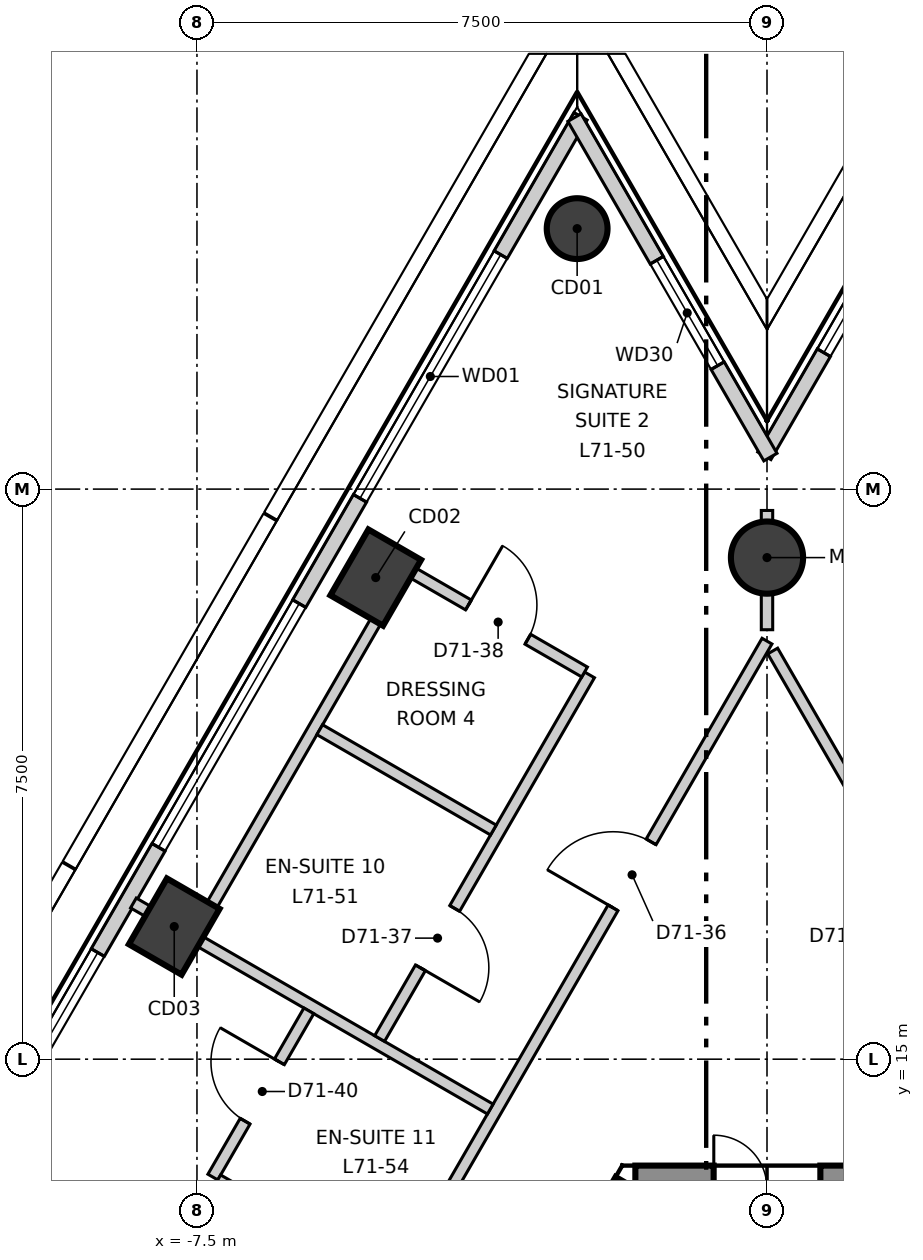
"""IFC4 building model, lengths in metres.
Left out: names, types, materials, properties, quantities, classifications, styles, units other than length and angle.
Written with IfcOpenShell. Run it as: python <this file> out.ifc"""

import sys

from ifc_helpers import new_model, si_unit, direction, frame, frame_2d, origin, origin_2d, place, context, subcontext, project, spatial, polyline, rectangle, circle, outline, extrude, element, fill, save


model = new_model("IFC4")
c1 = context("Model", 3, precision=1e-05, world=origin(), true_north=direction((0.0, 1.0)))
c2 = subcontext(c1, "Body", "Model", "MODEL_VIEW")
j1 = project(units=[si_unit("LENGTHUNIT", "METRE"), si_unit("PLANEANGLEUNIT", "RADIAN")], contexts=[c1])
p1 = place(None, origin())
s1 = spatial("IfcSite", under=j1, at=p1, CompositionType="ELEMENT")
p2 = place(p1, origin())
s2 = spatial("IfcBuilding", under=s1, at=p2, CompositionType="ELEMENT")
p3 = place(p2, frame((0.0, 0.0, 300.7)))
s3 = spatial("IfcBuildingStorey", under=s2, at=p3, CompositionType="ELEMENT", Elevation=300.7)
p4 = place(p3, frame((1.732, 13.3, -0.3), z_axis=(0.0, 0.0, 1.0), x_axis=(-1.0, 0.0, 0.0)))
e1 = element("IfcWall", 1, at=p4, inside=s3, PredefinedType="SHEAR", context=c2, shape_type="SweptSolid", body=[
    extrude(outline(polyline([(-0.173, -0.3), (1.732, -0.3), (3.637, -0.3), (3.291, 0.3), (1.732, 0.3), (0.173, 0.3), (-0.173, -0.3)])), origin(), (0.0, 0.0, 1.0), 3.6),
])
p5 = place(p4, frame((1.032, 0.0, 0.3)))
e2 = element("IfcOpeningElement", 2, at=p5, cuts=e1, PredefinedType="OPENING", context=c2, shape_type="SweptSolid", body=[
    extrude(rectangle(XDim=1.4, YDim=2.1, at=frame_2d((0.7, 1.05))), frame((0.0, 0.31, 0.0), z_axis=(0.0, -1.0, 0.0), x_axis=(1.0, 0.0, 0.0)), (0.0, 0.0, 1.0), 0.62),
])
p6 = place(p3, frame((-1.732, 13.3, -0.3), z_axis=(0.0, 0.0, 1.0), x_axis=(-0.500000539815, -0.866025092122, 0.0)))
e3 = element("IfcWall", 3, at=p6, inside=s3, PredefinedType="SHEAR", context=c2, shape_type="SweptSolid", body=[
    extrude(outline(polyline([(-0.173, -0.3), (1.795, -0.3), (3.763, -0.3), (5.732, -0.3), (7.7, -0.3), (9.668, -0.301), (11.637, -0.301), (13.605, -0.301), (15.573, -0.301), (17.542, -0.301), (19.51, -0.301), (21.478, -0.301), (21.131, 0.3), (19.226, 0.3), (17.321, 0.3), (15.415, 0.3), (13.51, 0.3), (11.605, 0.3), (9.699, 0.3), (7.794, 0.3), (5.889, 0.3), (3.984, 0.3), (2.078, 0.3), (0.173, 0.3), (-0.173, -0.3)])), origin(), (0.0, 0.0, 1.0), 3.6),
])
p7 = place(p6, frame((10.102, 0.0, 0.3)))
e4 = element("IfcOpeningElement", 4, at=p7, cuts=e3, PredefinedType="OPENING", context=c2, shape_type="SweptSolid", body=[
    extrude(rectangle(XDim=1.1, YDim=2.1, at=frame_2d((0.55, 1.05))), frame((0.0, 0.31, 0.0), z_axis=(0.0, -1.0, 0.0), x_axis=(1.0, 0.0, 0.0)), (0.0, 0.0, 1.0), 0.621),
])
p8 = place(p6, frame((16.378, 0.0, 0.3)))
e5 = element("IfcOpeningElement", 5, at=p8, cuts=e3, PredefinedType="OPENING", context=c2, shape_type="SweptSolid", body=[
    extrude(rectangle(XDim=0.9, YDim=2.1, at=frame_2d((0.45, 1.05))), frame((0.0, 0.31, 0.0), z_axis=(0.0, -1.0, 0.0), x_axis=(1.0, 0.0, 0.0)), (0.0, 0.0, 1.0), 0.621),
])
p9 = place(p6, frame((4.026, 0.0, 0.3)))
e6 = element("IfcOpeningElement", 6, at=p9, cuts=e3, PredefinedType="OPENING", context=c2, shape_type="SweptSolid", body=[
    extrude(rectangle(XDim=0.9, YDim=2.1, at=frame_2d((0.45, 1.05))), frame((0.0, 0.31, 0.0), z_axis=(0.0, -1.0, 0.0), x_axis=(1.0, 0.0, 0.0)), (0.0, 0.0, 1.0), 0.621),
])
p10 = place(p3, frame((-2.498, 25.927, -0.3), z_axis=(0.0, 0.0, 1.0), x_axis=(0.5, 0.866025403784, 0.0)))
e7 = element("IfcColumn", 7, at=p10, inside=s3, PredefinedType="COLUMN", context=c2, shape_type="SweptSolid", body=[
    extrude(circle(Radius=0.4, at=origin_2d()), origin(), (0.0, 0.0, 1.0), 3.6),
])
for number, where, z_axis, x_axis in (
    (8, (-5.148, 21.336, -0.3), (0.0, 0.0, 1.0), (0.5, 0.866, 0.0)),
    (9, (-7.799, 16.745, -0.3), (0.0, 0.0, 1.0), (0.5, 0.866, 0.0)),
):
    element("IfcColumn", number, at=place(p3, frame(where, z_axis=z_axis, x_axis=x_axis)), inside=s3, PredefinedType="COLUMN", context=c2, shape_type="SweptSolid", body=[
        extrude(rectangle(XDim=1.0, YDim=0.8, at=origin_2d()), origin(), (0.0, 0.0, 1.0), 3.6),
    ])
p11 = place(p3, frame((0.0, 21.599, -0.3), z_axis=(0.0, 0.0, 1.0), x_axis=(1.0, 0.0, 0.0)))
e10 = element("IfcColumn", 10, at=p11, inside=s3, PredefinedType="COLUMN", context=c2, shape_type="SweptSolid", body=[
    extrude(circle(Radius=0.475, at=origin_2d()), origin(), (0.0, 0.0, 1.0), 3.6),
])
p12 = place(p3, frame((-2.453, 27.405, 0.0), z_axis=(0.0, 0.0, 1.0), x_axis=(-0.500000041859, -0.866025379617, 0.0)))
e11 = element("IfcWall", 11, at=p12, inside=s3, PredefinedType="ELEMENTEDWALL", context=c2, shape_type="SweptSolid", body=[
    extrude(rectangle(XDim=44.994, YDim=0.2, at=frame_2d((22.497, 0.0))), origin(), (0.0, 0.0, 1.0), 3.3),
])
p13 = place(p12, frame((2.103, 0.0, 0.9)))
e12 = element("IfcOpeningElement", 12, at=p13, cuts=e11, PredefinedType="OPENING", context=c2, shape_type="SweptSolid", body=[
    extrude(rectangle(XDim=3.7, YDim=2.2, at=frame_2d((1.85, 1.1))), frame((0.0, 0.11, 0.0), z_axis=(0.0, -1.0, 0.0), x_axis=(1.0, 0.0, 0.0)), (0.0, 0.0, 1.0), 0.22),
])
p14 = place(p12, frame((7.404, 0.0, 0.9)))
e13 = element("IfcOpeningElement", 13, at=p14, cuts=e11, PredefinedType="OPENING", context=c2, shape_type="SweptSolid", body=[
    extrude(rectangle(XDim=3.7, YDim=2.2, at=frame_2d((1.85, 1.1))), frame((0.0, 0.11, 0.0), z_axis=(0.0, -1.0, 0.0), x_axis=(1.0, 0.0, 0.0)), (0.0, 0.0, 1.0), 0.22),
])
p15 = place(p12, frame((12.705, 0.0, 0.9)))
e14 = element("IfcOpeningElement", 14, at=p15, cuts=e11, PredefinedType="OPENING", context=c2, shape_type="SweptSolid", body=[
    extrude(rectangle(XDim=3.7, YDim=2.2, at=frame_2d((1.85, 1.1))), frame((0.0, 0.11, 0.0), z_axis=(0.0, -1.0, 0.0), x_axis=(1.0, 0.0, 0.0)), (0.0, 0.0, 1.0), 0.22),
])
p16 = place(p12, frame((18.006, 0.0, 0.9)))
e15 = element("IfcOpeningElement", 15, at=p16, cuts=e11, PredefinedType="OPENING", context=c2, shape_type="SweptSolid", body=[
    extrude(rectangle(XDim=3.7, YDim=2.2, at=frame_2d((1.85, 1.1))), frame((0.0, 0.11, 0.0), z_axis=(0.0, -1.0, 0.0), x_axis=(1.0, 0.0, 0.0)), (0.0, 0.0, 1.0), 0.22),
])
p17 = place(p12, frame((23.307, 0.0, 0.9)))
e16 = element("IfcOpeningElement", 16, at=p17, cuts=e11, PredefinedType="OPENING", context=c2, shape_type="SweptSolid", body=[
    extrude(rectangle(XDim=3.7, YDim=2.2, at=frame_2d((1.85, 1.1))), frame((0.0, 0.11, 0.0), z_axis=(0.0, -1.0, 0.0), x_axis=(1.0, 0.0, 0.0)), (0.0, 0.0, 1.0), 0.22),
])
p18 = place(p12, frame((28.608, 0.0, 0.9)))
e17 = element("IfcOpeningElement", 17, at=p18, cuts=e11, PredefinedType="OPENING", context=c2, shape_type="SweptSolid", body=[
    extrude(rectangle(XDim=3.7, YDim=2.2, at=frame_2d((1.85, 1.1))), frame((0.0, 0.11, 0.0), z_axis=(0.0, -1.0, 0.0), x_axis=(1.0, 0.0, 0.0)), (0.0, 0.0, 1.0), 0.22),
])
p19 = place(p12, frame((33.909, 0.0, 0.9)))
e18 = element("IfcOpeningElement", 18, at=p19, cuts=e11, PredefinedType="OPENING", context=c2, shape_type="SweptSolid", body=[
    extrude(rectangle(XDim=3.7, YDim=2.2, at=frame_2d((1.85, 1.1))), frame((0.0, 0.11, 0.0), z_axis=(0.0, -1.0, 0.0), x_axis=(1.0, 0.0, 0.0)), (0.0, 0.0, 1.0), 0.22),
])
p20 = place(p12, frame((39.21, 0.0, 0.9)))
e19 = element("IfcOpeningElement", 19, at=p20, cuts=e11, PredefinedType="OPENING", context=c2, shape_type="SweptSolid", body=[
    extrude(rectangle(XDim=3.7, YDim=2.2, at=frame_2d((1.85, 1.1))), frame((0.0, 0.11, 0.0), z_axis=(0.0, -1.0, 0.0), x_axis=(1.0, 0.0, 0.0)), (0.0, 0.0, 1.0), 0.22),
])
p21 = place(p3, frame((2.543, 27.405, 0.0), z_axis=(0.0, 0.0, 1.0), x_axis=(-0.49983036304, -0.866123321579, 0.0)))
e20 = element("IfcWall", 20, at=p21, inside=s3, PredefinedType="ELEMENTEDWALL", context=c2, shape_type="SweptSolid", body=[
    extrude(rectangle(XDim=5.157, YDim=0.2, at=frame_2d((2.579, 0.0))), origin(), (0.0, 0.0, 1.0), 3.3),
])
p22 = place(p21, frame((1.99, 0.0, 0.9)))
e21 = element("IfcOpeningElement", 21, at=p22, cuts=e20, PredefinedType="OPENING", context=c2, shape_type="SweptSolid", body=[
    extrude(rectangle(XDim=1.6, YDim=2.2, at=frame_2d((0.8, 1.1))), frame((0.0, 0.11, 0.0), z_axis=(0.0, -1.0, 0.0), x_axis=(1.0, 0.0, 0.0)), (0.0, 0.0, 1.0), 0.22),
])
p23 = place(p3, frame((0.045, 22.921, 0.0), z_axis=(0.0, 0.0, 1.0), x_axis=(-0.49983036304, 0.866123321579, 0.0)))
e22 = element("IfcWall", 22, at=p23, inside=s3, PredefinedType="ELEMENTEDWALL", context=c2, shape_type="SweptSolid", body=[
    extrude(rectangle(XDim=5.157, YDim=0.2, at=frame_2d((2.579, 0.0))), origin(), (0.0, 0.0, 1.0), 3.3),
])
p24 = place(p23, frame((1.39, 0.0, 0.9)))
e23 = element("IfcOpeningElement", 23, at=p24, cuts=e22, PredefinedType="OPENING", context=c2, shape_type="SweptSolid", body=[
    extrude(rectangle(XDim=1.6, YDim=2.2, at=frame_2d((0.8, 1.1))), frame((0.0, 0.11, 0.0), z_axis=(0.0, -1.0, 0.0), x_axis=(1.0, 0.0, 0.0)), (0.0, 0.0, 1.0), 0.22),
])
p25 = place(p3, frame((-17.679, -10.12, 0.0), z_axis=(0.0, 0.0, 1.0), x_axis=(0.500008955215, 0.866020233427, 0.0)))
e24 = element("IfcWall", 24, at=p25, inside=s3, PredefinedType="PARTITIONING", context=c2, shape_type="SweptSolid", body=[
    extrude(rectangle(XDim=35.357, YDim=0.15, at=frame_2d((17.679, 0.0))), origin(), (0.0, 0.0, 1.0), 3.3),
])
p26 = place(p25, frame((31.307, 0.0, 0.0)))
e25 = element("IfcOpeningElement", 25, at=p26, cuts=e24, PredefinedType="OPENING", context=c2, shape_type="SweptSolid", body=[
    extrude(rectangle(XDim=1.0, YDim=2.1, at=frame_2d((0.5, 1.05))), frame((0.0, 0.085, 0.0), z_axis=(0.0, -1.0, 0.0), x_axis=(1.0, 0.0, 0.0)), (0.0, 0.0, 1.0), 0.17),
])
p27 = place(p25, frame((20.056, 0.0, 0.0)))
e26 = element("IfcOpeningElement", 26, at=p27, cuts=e24, PredefinedType="OPENING", context=c2, shape_type="SweptSolid", body=[
    extrude(rectangle(XDim=1.0, YDim=2.1, at=frame_2d((0.5, 1.05))), frame((0.0, 0.085, 0.0), z_axis=(0.0, -1.0, 0.0), x_axis=(1.0, 0.0, 0.0)), (0.0, 0.0, 1.0), 0.17),
])
p28 = place(p25, frame((13.253, 0.0, 0.0)))
e27 = element("IfcOpeningElement", 27, at=p28, cuts=e24, PredefinedType="OPENING", context=c2, shape_type="SweptSolid", body=[
    extrude(rectangle(XDim=1.0, YDim=2.1, at=frame_2d((0.5, 1.05))), frame((0.0, 0.085, 0.0), z_axis=(0.0, -1.0, 0.0), x_axis=(1.0, 0.0, 0.0)), (0.0, 0.0, 1.0), 0.17),
])
p29 = place(p25, frame((7.653, 0.0, 0.0)))
e28 = element("IfcOpeningElement", 28, at=p29, cuts=e24, PredefinedType="OPENING", context=c2, shape_type="SweptSolid", body=[
    extrude(rectangle(XDim=1.0, YDim=2.1, at=frame_2d((0.5, 1.05))), frame((0.0, 0.085, 0.0), z_axis=(0.0, -1.0, 0.0), x_axis=(1.0, 0.0, 0.0)), (0.0, 0.0, 1.0), 0.17),
])
p30 = place(p25, frame((2.952, 0.0, 0.0)))
e29 = element("IfcOpeningElement", 29, at=p30, cuts=e24, PredefinedType="OPENING", context=c2, shape_type="SweptSolid", body=[
    extrude(rectangle(XDim=1.0, YDim=2.1, at=frame_2d((0.5, 1.05))), frame((0.0, 0.085, 0.0), z_axis=(0.0, -1.0, 0.0), x_axis=(1.0, 0.0, 0.0)), (0.0, 0.0, 1.0), 0.17),
])
p31 = place(p3, frame((-8.336, 17.055, 0.0), z_axis=(0.0, 0.0, 1.0), x_axis=(0.865995092734, -0.500052496605, 0.0)))
e30 = element("IfcWall", 30, at=p31, inside=s3, PredefinedType="PARTITIONING", context=c2, shape_type="SweptSolid", body=[
    extrude(rectangle(XDim=5.421, YDim=0.15, at=frame_2d((2.711, 0.0))), origin(), (0.0, 0.0, 1.0), 3.3),
])
p32 = place(p3, frame((0.0, 20.65, 0.0), z_axis=(0.0, 0.0, 1.0), x_axis=(0.0, 1.0, 0.0)))
e31 = element("IfcWall", 31, at=p32, inside=s3, PredefinedType="PARTITIONING", context=c2, shape_type="SweptSolid", body=[
    extrude(rectangle(XDim=1.569, YDim=0.15, at=frame_2d((0.785, 0.0))), origin(), (0.0, 0.0, 1.0), 2.8),
])
p33 = place(p3, frame((0.075, 20.37, 0.0), z_axis=(0.0, 0.0, 1.0), x_axis=(0.500009775255, -0.866019759965, 0.0)))
e32 = element("IfcWall", 32, at=p33, inside=s3, PredefinedType="PARTITIONING", context=c2, shape_type="SweptSolid", body=[
    extrude(rectangle(XDim=35.207, YDim=0.15, at=frame_2d((17.604, 0.0))), origin(), (0.0, 0.0, 1.0), 3.3),
])
p34 = place(p33, frame((31.307, 0.0, 0.0)))
e33 = element("IfcOpeningElement", 33, at=p34, cuts=e32, PredefinedType="OPENING", context=c2, shape_type="SweptSolid", body=[
    extrude(rectangle(XDim=1.0, YDim=2.1, at=frame_2d((0.5, 1.05))), frame((0.0, 0.085, 0.0), z_axis=(0.0, -1.0, 0.0), x_axis=(1.0, 0.0, 0.0)), (0.0, 0.0, 1.0), 0.17),
])
p35 = place(p33, frame((20.355, 0.0, 0.0)))
e34 = element("IfcOpeningElement", 34, at=p35, cuts=e32, PredefinedType="OPENING", context=c2, shape_type="SweptSolid", body=[
    extrude(rectangle(XDim=1.0, YDim=2.1, at=frame_2d((0.5, 1.05))), frame((0.0, 0.085, 0.0), z_axis=(0.0, -1.0, 0.0), x_axis=(1.0, 0.0, 0.0)), (0.0, 0.0, 1.0), 0.17),
])
p36 = place(p33, frame((24.355, 0.0, 0.0)))
e35 = element("IfcOpeningElement", 35, at=p36, cuts=e32, PredefinedType="OPENING", context=c2, shape_type="SweptSolid", body=[
    extrude(rectangle(XDim=0.9, YDim=2.1, at=frame_2d((0.45, 1.05))), frame((0.0, 0.085, 0.0), z_axis=(0.0, -1.0, 0.0), x_axis=(1.0, 0.0, 0.0)), (0.0, 0.0, 1.0), 0.17),
])
p37 = place(p33, frame((22.255, 0.0, 0.0)))
e36 = element("IfcOpeningElement", 36, at=p37, cuts=e32, PredefinedType="OPENING", context=c2, shape_type="SweptSolid", body=[
    extrude(rectangle(XDim=0.9, YDim=2.1, at=frame_2d((0.45, 1.05))), frame((0.0, 0.085, 0.0), z_axis=(0.0, -1.0, 0.0), x_axis=(1.0, 0.0, 0.0)), (0.0, 0.0, 1.0), 0.17),
])
p38 = place(p33, frame((8.453, 0.0, 0.0)))
e37 = element("IfcOpeningElement", 37, at=p38, cuts=e32, PredefinedType="OPENING", context=c2, shape_type="SweptSolid", body=[
    extrude(rectangle(XDim=1.0, YDim=2.1, at=frame_2d((0.5, 1.05))), frame((0.0, 0.085, 0.0), z_axis=(0.0, -1.0, 0.0), x_axis=(1.0, 0.0, 0.0)), (0.0, 0.0, 1.0), 0.17),
])
p39 = place(p33, frame((13.753, 0.0, 0.0)))
e38 = element("IfcOpeningElement", 38, at=p39, cuts=e32, PredefinedType="OPENING", context=c2, shape_type="SweptSolid", body=[
    extrude(rectangle(XDim=0.9, YDim=2.1, at=frame_2d((0.45, 1.05))), frame((0.0, 0.085, 0.0), z_axis=(0.0, -1.0, 0.0), x_axis=(1.0, 0.0, 0.0)), (0.0, 0.0, 1.0), 0.17),
])
p40 = place(p33, frame((11.553, 0.0, 0.0)))
e39 = element("IfcOpeningElement", 39, at=p40, cuts=e32, PredefinedType="OPENING", context=c2, shape_type="SweptSolid", body=[
    extrude(rectangle(XDim=0.9, YDim=2.1, at=frame_2d((0.45, 1.05))), frame((0.0, 0.085, 0.0), z_axis=(0.0, -1.0, 0.0), x_axis=(1.0, 0.0, 0.0)), (0.0, 0.0, 1.0), 0.17),
])
p41 = place(p33, frame((2.951, 0.0, 0.0)))
e40 = element("IfcOpeningElement", 40, at=p41, cuts=e32, PredefinedType="OPENING", context=c2, shape_type="SweptSolid", body=[
    extrude(rectangle(XDim=1.0, YDim=2.1, at=frame_2d((0.5, 1.05))), frame((0.0, 0.085, 0.0), z_axis=(0.0, -1.0, 0.0), x_axis=(1.0, 0.0, 0.0)), (0.0, 0.0, 1.0), 0.17),
])
p42 = place(p3, frame((-5.097, 15.272, 0.0), z_axis=(0.0, 0.0, 1.0), x_axis=(0.499994082372, 0.866028820302, 0.0)))
e41 = element("IfcWall", 41, at=p42, inside=s3, PredefinedType="PARTITIONING", context=c2, shape_type="SweptSolid", body=[
    extrude(rectangle(XDim=5.524, YDim=0.15, at=frame_2d((2.762, 0.0))), origin(), (0.0, 0.0, 1.0), 3.3),
])
p43 = place(p42, frame((1.075, 0.0, 0.0)))
e42 = element("IfcOpeningElement", 42, at=p43, cuts=e41, PredefinedType="OPENING", context=c2, shape_type="SweptSolid", body=[
    extrude(rectangle(XDim=0.9, YDim=2.1, at=frame_2d((0.45, 1.05))), frame((0.0, 0.085, 0.0), z_axis=(0.0, -1.0, 0.0), x_axis=(1.0, 0.0, 0.0)), (0.0, 0.0, 1.0), 0.17),
])
p44 = place(p3, frame((-7.512, 16.666, 0.0), z_axis=(0.0, 0.0, 1.0), x_axis=(0.500050108258, 0.865996471835, 0.0)))
e43 = element("IfcWall", 43, at=p44, inside=s3, PredefinedType="PARTITIONING", context=c2, shape_type="SweptSolid", body=[
    extrude(rectangle(XDim=5.525, YDim=0.15, at=frame_2d((2.763, 0.0))), origin(), (0.0, 0.0, 1.0), 2.6),
])
p45 = place(p3, frame((-7.291, 13.449, 0.0), z_axis=(0.0, 0.0, 1.0), x_axis=(0.500079482444, 0.865979509711, 0.0)))
e44 = element("IfcWall", 44, at=p45, inside=s3, PredefinedType="PARTITIONING", context=c2, shape_type="SweptSolid", body=[
    extrude(rectangle(XDim=2.525, YDim=0.15, at=frame_2d((1.263, 0.0))), origin(), (0.0, 0.0, 1.0), 3.3),
])
p46 = place(p45, frame((0.85, 0.0, 0.0)))
e45 = element("IfcOpeningElement", 45, at=p46, cuts=e44, PredefinedType="OPENING", context=c2, shape_type="SweptSolid", body=[
    extrude(rectangle(XDim=0.9, YDim=2.1, at=frame_2d((0.45, 1.05))), frame((0.0, 0.085, 0.0), z_axis=(0.0, -1.0, 0.0), x_axis=(1.0, 0.0, 0.0)), (0.0, 0.0, 1.0), 0.17),
])
p47 = place(p3, frame((-7.226, 13.412, 0.0), z_axis=(0.0, 0.0, 1.0), x_axis=(0.866065407652, -0.499930704866, 0.0)))
e46 = element("IfcWall", 46, at=p47, inside=s3, PredefinedType="PARTITIONING", context=c2, shape_type="SweptSolid", body=[
    extrude(rectangle(XDim=2.638, YDim=0.15, at=frame_2d((1.319, 0.0))), origin(), (0.0, 0.0, 1.0), 3.3),
])
p48 = place(p3, frame((-4.685, 21.413, 0.0), z_axis=(0.0, 0.0, 1.0), x_axis=(0.866065407652, -0.499930704866, 0.0)))
e47 = element("IfcWall", 47, at=p48, inside=s3, PredefinedType="PARTITIONING", context=c2, shape_type="SweptSolid", body=[
    extrude(rectangle(XDim=2.638, YDim=0.15, at=frame_2d((1.319, 0.0))), origin(), (0.0, 0.0, 1.0), 3.3),
])
p49 = place(p48, frame((0.875, 0.0, 0.0)))
e48 = element("IfcOpeningElement", 48, at=p49, cuts=e47, PredefinedType="OPENING", context=c2, shape_type="SweptSolid", body=[
    extrude(rectangle(XDim=0.9, YDim=2.1, at=frame_2d((0.45, 1.05))), frame((0.0, 0.085, 0.0), z_axis=(0.0, -1.0, 0.0), x_axis=(1.0, 0.0, 0.0)), (0.0, 0.0, 1.0), 0.17),
])
p50 = place(p3, frame((-5.885, 19.335, 0.0), z_axis=(0.0, 0.0, 1.0), x_axis=(0.865881993967, -0.500248310865, 0.0)))
e49 = element("IfcWall", 49, at=p50, inside=s3, PredefinedType="PARTITIONING", context=c2, shape_type="SweptSolid", body=[
    extrude(rectangle(XDim=2.639, YDim=0.15, at=frame_2d((1.319, 0.0))), origin(), (0.0, 0.0, 1.0), 3.3),
])
p51 = place(p13, origin())
e50 = element("IfcWindow", 50, at=p51, inside=s3, PartitioningType="SINGLE_PANEL", PredefinedType="WINDOW", context=c2, shape_type="SweptSolid", body=[
    extrude(rectangle(XDim=3.7, YDim=2.2, at=frame_2d((1.85, 1.1))), frame((0.0, 0.03, 0.0), z_axis=(0.0, -1.0, 0.0), x_axis=(1.0, 0.0, 0.0)), (0.0, 0.0, 1.0), 0.06),
])
fill(e12, e50)
p52 = place(p14, origin())
e51 = element("IfcWindow", 51, at=p52, inside=s3, PartitioningType="SINGLE_PANEL", PredefinedType="WINDOW", context=c2, shape_type="SweptSolid", body=[
    extrude(rectangle(XDim=3.7, YDim=2.2, at=frame_2d((1.85, 1.1))), frame((0.0, 0.03, 0.0), z_axis=(0.0, -1.0, 0.0), x_axis=(1.0, 0.0, 0.0)), (0.0, 0.0, 1.0), 0.06),
])
fill(e13, e51)
p53 = place(p15, origin())
e52 = element("IfcWindow", 52, at=p53, inside=s3, PartitioningType="SINGLE_PANEL", PredefinedType="WINDOW", context=c2, shape_type="SweptSolid", body=[
    extrude(rectangle(XDim=3.7, YDim=2.2, at=frame_2d((1.85, 1.1))), frame((0.0, 0.03, 0.0), z_axis=(0.0, -1.0, 0.0), x_axis=(1.0, 0.0, 0.0)), (0.0, 0.0, 1.0), 0.06),
])
fill(e14, e52)
p54 = place(p22, origin())
e53 = element("IfcWindow", 53, at=p54, inside=s3, PartitioningType="SINGLE_PANEL", PredefinedType="WINDOW", context=c2, shape_type="SweptSolid", body=[
    extrude(rectangle(XDim=1.6, YDim=2.2, at=frame_2d((0.8, 1.1))), frame((0.0, 0.03, 0.0), z_axis=(0.0, -1.0, 0.0), x_axis=(1.0, 0.0, 0.0)), (0.0, 0.0, 1.0), 0.06),
])
fill(e21, e53)
p55 = place(p24, origin())
e54 = element("IfcWindow", 54, at=p55, inside=s3, PartitioningType="SINGLE_PANEL", PredefinedType="WINDOW", context=c2, shape_type="SweptSolid", body=[
    extrude(rectangle(XDim=1.6, YDim=2.2, at=frame_2d((0.8, 1.1))), frame((0.0, 0.03, 0.0), z_axis=(0.0, -1.0, 0.0), x_axis=(1.0, 0.0, 0.0)), (0.0, 0.0, 1.0), 0.06),
])
fill(e23, e54)
p56 = place(p26, origin())
e55 = element("IfcDoor", 55, at=p56, inside=s3, OperationType="SINGLE_SWING_RIGHT", PredefinedType="DOOR", context=c2, shape_type="SweptSolid", body=[
    extrude(rectangle(XDim=1.0, YDim=2.1, at=frame_2d((0.5, 1.05))), frame((0.0, 0.025, 0.0), z_axis=(0.0, -1.0, 0.0), x_axis=(1.0, 0.0, 0.0)), (0.0, 0.0, 1.0), 0.05),
])
fill(e25, e55)
p57 = place(p43, origin())
e56 = element("IfcDoor", 56, at=p57, inside=s3, OperationType="SINGLE_SWING_LEFT", PredefinedType="DOOR", context=c2, shape_type="SweptSolid", body=[
    extrude(rectangle(XDim=0.9, YDim=2.1, at=frame_2d((0.45, 1.05))), frame((0.0, 0.025, 0.0), z_axis=(0.0, -1.0, 0.0), x_axis=(1.0, 0.0, 0.0)), (0.0, 0.0, 1.0), 0.05),
])
fill(e42, e56)
p58 = place(p49, origin())
e57 = element("IfcDoor", 57, at=p58, inside=s3, OperationType="SINGLE_SWING_RIGHT", PredefinedType="DOOR", context=c2, shape_type="SweptSolid", body=[
    extrude(rectangle(XDim=0.9, YDim=2.1, at=frame_2d((0.45, 1.05))), frame((0.0, 0.025, 0.0), z_axis=(0.0, -1.0, 0.0), x_axis=(1.0, 0.0, 0.0)), (0.0, 0.0, 1.0), 0.05),
])
fill(e48, e57)
p59 = place(p46, origin())
e58 = element("IfcDoor", 58, at=p59, inside=s3, OperationType="SINGLE_SWING_LEFT", PredefinedType="DOOR", context=c2, shape_type="SweptSolid", body=[
    extrude(rectangle(XDim=0.9, YDim=2.1, at=frame_2d((0.45, 1.05))), frame((0.0, 0.025, 0.0), z_axis=(0.0, -1.0, 0.0), x_axis=(1.0, 0.0, 0.0)), (0.0, 0.0, 1.0), 0.05),
])
fill(e45, e58)
save(model, sys.argv[1])
